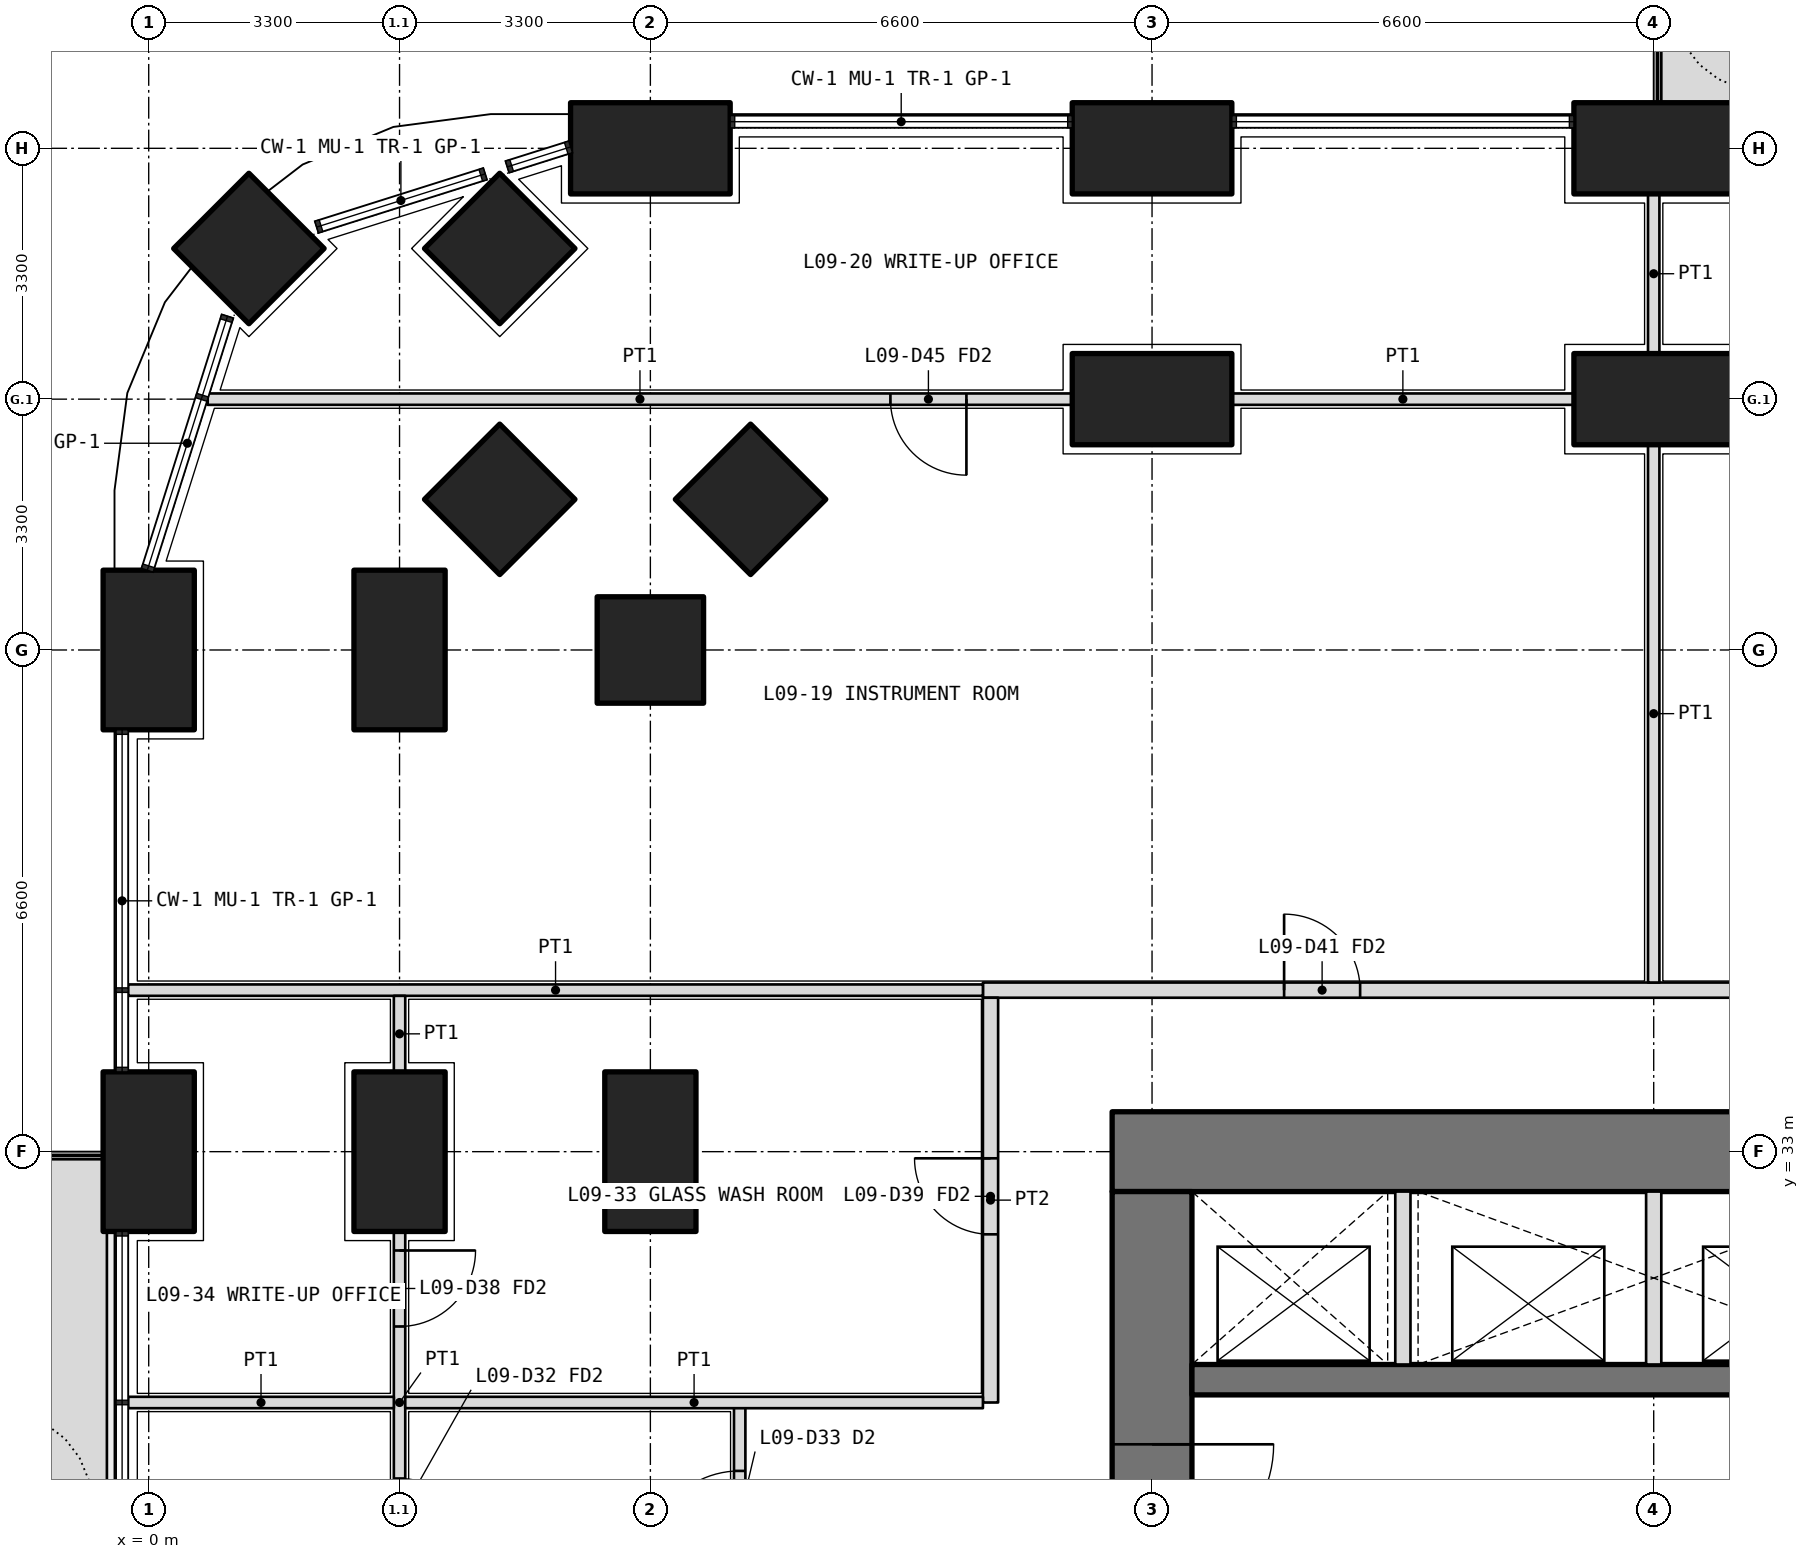
"""IFC4 building model, lengths in metres.
Left out: names, types, materials, properties, quantities, classifications, styles, units other than length and angle.
Written with IfcOpenShell. Run it as: python <this file> out.ifc"""

import sys

from ifc_helpers import new_model, si_unit, direction, frame, frame_2d, origin, origin_2d, place, context, subcontext, project, spatial, polyline, rectangle, outline, extrude, element, fill, save


model = new_model("IFC4")
c1 = context("Model", 3, precision=1e-05, world=origin(), true_north=direction((0.0, 1.0)))
c2 = subcontext(c1, "Body", "Model", "MODEL_VIEW")
j1 = project(units=[si_unit("LENGTHUNIT", "METRE"), si_unit("PLANEANGLEUNIT", "RADIAN")], contexts=[c1])
p1 = place(None, origin())
s1 = spatial("IfcSite", under=j1, at=p1, CompositionType="ELEMENT")
p2 = place(p1, origin())
s2 = spatial("IfcBuilding", under=s1, at=p2, CompositionType="ELEMENT")
p3 = place(p2, frame((0.0, 0.0, 42.3)))
s3 = spatial("IfcBuildingStorey", under=s2, at=p3, CompositionType="ELEMENT", Elevation=42.3)
p4 = place(p3, frame((1.318, 44.882, 0.0), z_axis=(0.0, 0.0, 1.0), x_axis=(0.707106781187, 0.707106781187, 0.0)))
e1 = element("IfcColumn", 1, at=p4, inside=s3, PredefinedType="COLUMN", context=c2, shape_type="SweptSolid", body=[
    extrude(rectangle(XDim=1.4, YDim=1.4, at=origin_2d()), origin(), (0.0, 0.0, 1.0), 4.2),
])
for number, where, z_axis, x_axis in (
    (2, (0.0, 33.0, 0.0), (0.0, 0.0, 1.0), (0.0, 1.0, 0.0)),
    (3, (0.0, 39.6, 0.0), (0.0, 0.0, 1.0), (0.0, 1.0, 0.0)),
    (4, (6.6, 46.2, 0.0), (0.0, 0.0, 1.0), (1.0, 0.0, 0.0)),
    (5, (13.2, 46.2, 0.0), (0.0, 0.0, 1.0), (1.0, 0.0, 0.0)),
    (6, (19.8, 46.2, 0.0), (0.0, 0.0, 1.0), (1.0, 0.0, 0.0)),
):
    element("IfcColumn", number, at=place(p3, frame(where, z_axis=z_axis, x_axis=x_axis)), inside=s3, PredefinedType="COLUMN", context=c2, shape_type="SweptSolid", body=[
        extrude(rectangle(XDim=2.1, YDim=1.2, at=origin_2d()), origin(), (0.0, 0.0, 1.0), 4.2),
    ])
for number, where, z_axis, x_axis in (
    (7, (6.6, 39.6, 0.0), (0.0, 0.0, 1.0), (1.0, 0.0, 0.0)),
    (8, (4.618, 44.882, 0.0), (0.0, 0.0, 1.0), (0.707, 0.707, 0.0)),
):
    element("IfcColumn", number, at=place(p3, frame(where, z_axis=z_axis, x_axis=x_axis)), inside=s3, PredefinedType="COLUMN", context=c2, shape_type="SweptSolid", body=[
        extrude(rectangle(XDim=1.4, YDim=1.4, at=origin_2d()), origin(), (0.0, 0.0, 1.0), 4.2),
    ])
for number, where, z_axis, x_axis in (
    (9, (3.3, 33.0, 0.0), (0.0, 0.0, 1.0), (0.0, 1.0, 0.0)),
    (10, (3.3, 39.6, 0.0), (0.0, 0.0, 1.0), (0.0, 1.0, 0.0)),
):
    element("IfcColumn", number, at=place(p3, frame(where, z_axis=z_axis, x_axis=x_axis)), inside=s3, PredefinedType="COLUMN", context=c2, shape_type="SweptSolid", body=[
        extrude(rectangle(XDim=2.1, YDim=1.2, at=origin_2d()), origin(), (0.0, 0.0, 1.0), 4.2),
    ])
p5 = place(p3, frame((4.618, 41.582, 0.0), z_axis=(0.0, 0.0, 1.0), x_axis=(0.707106781187, 0.707106781187, 0.0)))
e11 = element("IfcColumn", 11, at=p5, inside=s3, PredefinedType="COLUMN", context=c2, shape_type="SweptSolid", body=[
    extrude(rectangle(XDim=1.4, YDim=1.4, at=origin_2d()), origin(), (0.0, 0.0, 1.0), 4.2),
])
for number, where, z_axis, x_axis in (
    (12, (13.2, 42.9, 0.0), (0.0, 0.0, 1.0), (1.0, 0.0, 0.0)),
    (13, (19.8, 42.9, 0.0), (0.0, 0.0, 1.0), (1.0, 0.0, 0.0)),
):
    element("IfcColumn", number, at=place(p3, frame(where, z_axis=z_axis, x_axis=x_axis)), inside=s3, PredefinedType="COLUMN", context=c2, shape_type="SweptSolid", body=[
        extrude(rectangle(XDim=2.1, YDim=1.2, at=origin_2d()), origin(), (0.0, 0.0, 1.0), 4.2),
    ])
p6 = place(p3, frame((7.918, 41.582, 0.0), z_axis=(0.0, 0.0, 1.0), x_axis=(0.707106781187, 0.707106781187, 0.0)))
e14 = element("IfcColumn", 14, at=p6, inside=s3, PredefinedType="COLUMN", context=c2, shape_type="SweptSolid", body=[
    extrude(rectangle(XDim=1.4, YDim=1.4, at=origin_2d()), origin(), (0.0, 0.0, 1.0), 4.2),
])
p7 = place(p3, frame((6.6, 33.0, 0.0), z_axis=(0.0, 0.0, 1.0), x_axis=(0.0, 1.0, 0.0)))
e15 = element("IfcColumn", 15, at=p7, inside=s3, PredefinedType="COLUMN", context=c2, shape_type="SweptSolid", body=[
    extrude(rectangle(XDim=2.1, YDim=1.2, at=origin_2d()), origin(), (0.0, 0.0, 1.0), 4.2),
])
p8 = place(p3, origin())
e16 = element("IfcWall", 16, at=p8, inside=s3, PredefinedType="USERDEFINED", context=c2, shape_type="SweptSolid", body=[
    extrude(outline(polyline([(19.9, 46.75), (22.35, 46.75), (22.35, 47.75), (19.9, 47.75), (19.9, 46.75)]), holes=[polyline([(20.05, 46.9), (22.2, 46.9), (22.2, 47.6), (20.05, 47.6), (20.05, 46.9)])]), origin(), (0.0, 0.0, 1.0), 1.05),
])
p9 = place(p3, origin())
e17 = element("IfcWall", 17, at=p9, inside=s3, PredefinedType="USERDEFINED", context=c2, shape_type="SweptSolid", body=[
    extrude(outline(polyline([(-1.55, 23.85), (-0.55, 23.85), (-0.55, 32.9), (-1.55, 32.9), (-1.55, 23.85)]), holes=[polyline([(-1.4, 24.0), (-0.7, 24.0), (-0.7, 32.75), (-1.4, 32.75), (-1.4, 24.0)])]), origin(), (0.0, 0.0, 1.0), 1.05),
])
p10 = place(p3, frame((40.125, 33.0, 0.0), z_axis=(0.0, 0.0, 1.0), x_axis=(-1.0, 0.0, 0.0)))
e18 = element("IfcWall", 18, at=p10, inside=s3, PredefinedType="SHEAR", context=c2, shape_type="SweptSolid", body=[
    extrude(rectangle(XDim=27.45, YDim=1.05, at=frame_2d((13.725, 0.0))), origin(), (0.0, 0.0, 1.0), 4.2),
])
p11 = place(p3, frame((13.2, 32.475, 0.0), z_axis=(0.0, 0.0, 1.0), x_axis=(0.0, -1.0, 0.0)))
e19 = element("IfcWall", 19, at=p11, inside=s3, PredefinedType="SHEAR", context=c2, shape_type="SweptSolid", body=[
    extrude(rectangle(XDim=18.75, YDim=1.05, at=frame_2d((9.375, 0.0))), origin(), (0.0, 0.0, 1.0), 4.2),
])
p12 = place(p11, frame((14.125, 0.0, 0.0)))
e20 = element("IfcOpeningElement", 20, at=p12, cuts=e19, PredefinedType="OPENING", context=c2, shape_type="SweptSolid", body=[
    extrude(rectangle(XDim=1.6, YDim=2.1, at=frame_2d((0.8, 1.05))), frame((0.0, 0.535, 0.0), z_axis=(0.0, -1.0, 0.0), x_axis=(1.0, 0.0, 0.0)), (0.0, 0.0, 1.0), 1.07),
])
p13 = place(p11, frame((3.325, 0.0, 0.0)))
e21 = element("IfcOpeningElement", 21, at=p13, cuts=e19, PredefinedType="OPENING", context=c2, shape_type="SweptSolid", body=[
    extrude(rectangle(XDim=1.6, YDim=2.1, at=frame_2d((0.8, 1.05))), frame((0.0, 0.535, 0.0), z_axis=(0.0, -1.0, 0.0), x_axis=(1.0, 0.0, 0.0)), (0.0, 0.0, 1.0), 1.07),
])
p14 = place(p3, frame((13.725, 30.0, 0.0), z_axis=(0.0, 0.0, 1.0), x_axis=(1.0, 0.0, 0.0)))
e22 = element("IfcWall", 22, at=p14, inside=s3, PredefinedType="SHEAR", context=c2, shape_type="SweptSolid", body=[
    extrude(rectangle(XDim=25.35, YDim=0.4, at=frame_2d((12.675, 0.0))), origin(), (0.0, 0.0, 1.0), 4.2),
])
for number, where, z_axis, x_axis in (
    (23, (16.5, 30.2, 0.0), (0.0, 0.0, 1.0), (0.0, 1.0, 0.0)),
    (24, (19.8, 30.2, 0.0), (0.0, 0.0, 1.0), (0.0, 1.0, 0.0)),
):
    element("IfcWall", number, at=place(p3, frame(where, z_axis=z_axis, x_axis=x_axis)), inside=s3, PredefinedType="PARTITIONING", context=c2, shape_type="SweptSolid", body=[
        extrude(rectangle(XDim=2.275, YDim=0.2, at=frame_2d((1.138, 0.0))), origin(), (0.0, 0.0, 1.0), 4.2),
    ])
p15 = place(p3, frame((10.975, 35.125, 0.0), z_axis=(0.0, 0.0, 1.0), x_axis=(1.0, 0.0, 0.0)))
e25 = element("IfcWall", 25, at=p15, inside=s3, PredefinedType="PARTITIONING", context=c2, shape_type="SweptSolid", body=[
    extrude(rectangle(XDim=30.85, YDim=0.2, at=frame_2d((15.425, 0.0))), origin(), (0.0, 0.0, 1.0), 2.85),
])
p16 = place(p15, frame((3.962, 0.0, 0.0)))
e26 = element("IfcOpeningElement", 26, at=p16, cuts=e25, PredefinedType="OPENING", context=c2, shape_type="SweptSolid", body=[
    extrude(rectangle(XDim=1.0, YDim=2.1, at=frame_2d((0.5, 1.05))), frame((0.0, 0.11, 0.0), z_axis=(0.0, -1.0, 0.0), x_axis=(1.0, 0.0, 0.0)), (0.0, 0.0, 1.0), 0.22),
])
p17 = place(p15, frame((16.475, 0.0, 0.0)))
e27 = element("IfcOpeningElement", 27, at=p17, cuts=e25, PredefinedType="OPENING", context=c2, shape_type="SweptSolid", body=[
    extrude(rectangle(XDim=1.2, YDim=2.1, at=frame_2d((0.6, 1.05))), frame((0.0, 0.11, 0.0), z_axis=(0.0, -1.0, 0.0), x_axis=(1.0, 0.0, 0.0)), (0.0, 0.0, 1.0), 0.22),
])
p18 = place(p15, frame((27.438, 0.0, 0.0)))
e28 = element("IfcOpeningElement", 28, at=p18, cuts=e25, PredefinedType="OPENING", context=c2, shape_type="SweptSolid", body=[
    extrude(rectangle(XDim=1.2, YDim=2.1, at=frame_2d((0.6, 1.05))), frame((0.0, 0.11, 0.0), z_axis=(0.0, -1.0, 0.0), x_axis=(1.0, 0.0, 0.0)), (0.0, 0.0, 1.0), 0.22),
])
p19 = place(p3, frame((11.075, 29.7, 0.0), z_axis=(0.0, 0.0, 1.0), x_axis=(0.0, 1.0, 0.0)))
e29 = element("IfcWall", 29, at=p19, inside=s3, PredefinedType="PARTITIONING", context=c2, shape_type="SweptSolid", body=[
    extrude(rectangle(XDim=5.325, YDim=0.2, at=frame_2d((2.663, 0.0))), origin(), (0.0, 0.0, 1.0), 2.85),
])
p20 = place(p19, frame((2.212, 0.0, 0.0)))
e30 = element("IfcOpeningElement", 30, at=p20, cuts=e29, PredefinedType="OPENING", context=c2, shape_type="SweptSolid", body=[
    extrude(rectangle(XDim=1.0, YDim=2.1, at=frame_2d((0.5, 1.05))), frame((0.0, 0.11, 0.0), z_axis=(0.0, -1.0, 0.0), x_axis=(1.0, 0.0, 0.0)), (0.0, 0.0, 1.0), 0.22),
])
p21 = place(p3, frame((-0.27, 35.125, 0.0), z_axis=(0.0, 0.0, 1.0), x_axis=(1.0, 0.0, 0.0)))
e31 = element("IfcWall", 31, at=p21, inside=s3, PredefinedType="PARTITIONING", context=c2, shape_type="SweptSolid", body=[
    extrude(rectangle(XDim=11.245, YDim=0.15, at=frame_2d((5.623, 0.0))), origin(), (0.0, 0.0, 1.0), 2.7),
])
p22 = place(p3, frame((18.75, 42.9, 0.0), z_axis=(0.0, 0.0, 1.0), x_axis=(-1.0, 0.0, 0.0)))
e32 = element("IfcWall", 32, at=p22, inside=s3, PredefinedType="PARTITIONING", context=c2, shape_type="SweptSolid", body=[
    extrude(rectangle(XDim=4.5, YDim=0.15, at=frame_2d((2.25, 0.0))), origin(), (0.0, 0.0, 1.0), 3.9),
])
p23 = place(p3, frame((12.15, 42.9, 0.0), z_axis=(0.0, 0.0, 1.0), x_axis=(-1.0, 0.0, 0.0)))
e33 = element("IfcWall", 33, at=p23, inside=s3, PredefinedType="PARTITIONING", context=c2, shape_type="SweptSolid", body=[
    extrude(rectangle(XDim=11.374, YDim=0.15, at=frame_2d((5.687, 0.0))), origin(), (0.0, 0.0, 1.0), 2.7),
])
p24 = place(p23, frame((1.392, 0.0, 0.0)))
e34 = element("IfcOpeningElement", 34, at=p24, cuts=e33, PredefinedType="OPENING", context=c2, shape_type="SweptSolid", body=[
    extrude(rectangle(XDim=1.0, YDim=2.1, at=frame_2d((0.5, 1.05))), frame((0.0, 0.085, 0.0), z_axis=(0.0, -1.0, 0.0), x_axis=(1.0, 0.0, 0.0)), (0.0, 0.0, 1.0), 0.17),
])
p25 = place(p3, frame((19.8, 45.6, 0.0), z_axis=(0.0, 0.0, 1.0), x_axis=(0.0, -1.0, 0.0)))
e35 = element("IfcWall", 35, at=p25, inside=s3, PredefinedType="PARTITIONING", context=c2, shape_type="SweptSolid", body=[
    extrude(rectangle(XDim=2.1, YDim=0.15, at=frame_2d((1.05, 0.0))), origin(), (0.0, 0.0, 1.0), 2.85),
])
p26 = place(p3, frame((19.8, 42.3, 0.0), z_axis=(0.0, 0.0, 1.0), x_axis=(0.0, -1.0, 0.0)))
e36 = element("IfcWall", 36, at=p26, inside=s3, PredefinedType="PARTITIONING", context=c2, shape_type="SweptSolid", body=[
    extrude(rectangle(XDim=7.075, YDim=0.15, at=frame_2d((3.538, 0.0))), origin(), (0.0, 0.0, 1.0), 2.85),
])
p27 = place(p3, frame((3.3, 35.05, 0.0), z_axis=(0.0, 0.0, 1.0), x_axis=(0.0, -1.0, 0.0)))
e37 = element("IfcWall", 37, at=p27, inside=s3, PredefinedType="PARTITIONING", context=c2, shape_type="SweptSolid", body=[
    extrude(rectangle(XDim=1.0, YDim=0.15, at=frame_2d((0.5, 0.0))), origin(), (0.0, 0.0, 1.0), 3.9),
])
p28 = place(p3, frame((3.3, 31.95, 0.0), z_axis=(0.0, 0.0, 1.0), x_axis=(0.0, -1.0, 0.0)))
e38 = element("IfcWall", 38, at=p28, inside=s3, PredefinedType="PARTITIONING", context=c2, shape_type="SweptSolid", body=[
    extrude(rectangle(XDim=4.5, YDim=0.15, at=frame_2d((2.25, 0.0))), origin(), (0.0, 0.0, 1.0), 3.9),
])
p29 = place(p28, frame((3.25, 0.0, 0.0)))
e39 = element("IfcOpeningElement", 39, at=p29, cuts=e38, PredefinedType="OPENING", context=c2, shape_type="SweptSolid", body=[
    extrude(rectangle(XDim=1.0, YDim=2.1, at=frame_2d((0.5, 1.05))), frame((0.0, 0.085, 0.0), z_axis=(0.0, -1.0, 0.0), x_axis=(1.0, 0.0, 0.0)), (0.0, 0.0, 1.0), 0.17),
])
p30 = place(p28, frame((0.25, 0.0, 0.0)))
e40 = element("IfcOpeningElement", 40, at=p30, cuts=e38, PredefinedType="OPENING", context=c2, shape_type="SweptSolid", body=[
    extrude(rectangle(XDim=1.0, YDim=2.1, at=frame_2d((0.5, 1.05))), frame((0.0, 0.085, 0.0), z_axis=(0.0, -1.0, 0.0), x_axis=(1.0, 0.0, 0.0)), (0.0, 0.0, 1.0), 0.17),
])
p31 = place(p3, frame((7.775, 26.4, 0.0), z_axis=(0.0, 0.0, 1.0), x_axis=(0.0, 1.0, 0.0)))
e41 = element("IfcWall", 41, at=p31, inside=s3, PredefinedType="PARTITIONING", context=c2, shape_type="SweptSolid", body=[
    extrude(rectangle(XDim=3.3, YDim=0.15, at=frame_2d((1.65, 0.0))), origin(), (0.0, 0.0, 1.0), 2.85),
])
p32 = place(p31, frame((1.2, 0.0, 0.0)))
e42 = element("IfcOpeningElement", 42, at=p32, cuts=e41, PredefinedType="OPENING", context=c2, shape_type="SweptSolid", body=[
    extrude(rectangle(XDim=1.2, YDim=2.1, at=frame_2d((0.6, 1.05))), frame((0.0, 0.085, 0.0), z_axis=(0.0, -1.0, 0.0), x_axis=(1.0, 0.0, 0.0)), (0.0, 0.0, 1.0), 0.17),
])
p33 = place(p3, frame((-0.27, 29.7, 0.0), z_axis=(0.0, 0.0, 1.0), x_axis=(1.0, 0.0, 0.0)))
e43 = element("IfcWall", 43, at=p33, inside=s3, PredefinedType="PARTITIONING", context=c2, shape_type="SweptSolid", body=[
    extrude(rectangle(XDim=3.495, YDim=0.15, at=frame_2d((1.748, 0.0))), origin(), (0.0, 0.0, 1.0), 2.7),
])
p34 = place(p3, frame((3.375, 29.7, 0.0), z_axis=(0.0, 0.0, 1.0), x_axis=(1.0, 0.0, 0.0)))
e44 = element("IfcWall", 44, at=p34, inside=s3, PredefinedType="PARTITIONING", context=c2, shape_type="SweptSolid", body=[
    extrude(rectangle(XDim=7.6, YDim=0.15, at=frame_2d((3.8, 0.0))), origin(), (0.0, 0.0, 1.0), 3.9),
])
p35 = place(p16, origin())
e45 = element("IfcDoor", 45, at=p35, inside=s3, OperationType="SINGLE_SWING_LEFT", PredefinedType="DOOR", context=c2, shape_type="SweptSolid", body=[
    extrude(rectangle(XDim=1.0, YDim=2.1, at=frame_2d((0.5, 1.05))), frame((0.0, 0.025, 0.0), z_axis=(0.0, -1.0, 0.0), x_axis=(1.0, 0.0, 0.0)), (0.0, 0.0, 1.0), 0.05),
])
fill(e26, e45)
p36 = place(p24, origin())
e46 = element("IfcDoor", 46, at=p36, inside=s3, OperationType="SINGLE_SWING_LEFT", PredefinedType="DOOR", context=c2, shape_type="SweptSolid", body=[
    extrude(rectangle(XDim=1.0, YDim=2.1, at=frame_2d((0.5, 1.05))), frame((0.0, 0.025, 0.0), z_axis=(0.0, -1.0, 0.0), x_axis=(1.0, 0.0, 0.0)), (0.0, 0.0, 1.0), 0.05),
])
fill(e34, e46)
p37 = place(p32, origin())
e47 = element("IfcDoor", 47, at=p37, inside=s3, OperationType="DOUBLE_DOOR_SINGLE_SWING", PredefinedType="DOOR", context=c2, shape_type="SweptSolid", body=[
    extrude(rectangle(XDim=1.2, YDim=2.1, at=frame_2d((0.6, 1.05))), frame((0.0, 0.025, 0.0), z_axis=(0.0, -1.0, 0.0), x_axis=(1.0, 0.0, 0.0)), (0.0, 0.0, 1.0), 0.05),
])
fill(e42, e47)
p38 = place(p20, origin())
e48 = element("IfcDoor", 48, at=p38, inside=s3, OperationType="SINGLE_SWING_RIGHT", PredefinedType="DOOR", context=c2, shape_type="SweptSolid", body=[
    extrude(rectangle(XDim=1.0, YDim=2.1, at=frame_2d((0.5, 1.05))), frame((0.0, 0.025, 0.0), z_axis=(0.0, -1.0, 0.0), x_axis=(1.0, 0.0, 0.0)), (0.0, 0.0, 1.0), 0.05),
])
fill(e30, e48)
p39 = place(p30, origin())
e49 = element("IfcDoor", 49, at=p39, inside=s3, OperationType="SINGLE_SWING_LEFT", PredefinedType="DOOR", context=c2, shape_type="SweptSolid", body=[
    extrude(rectangle(XDim=1.0, YDim=2.1, at=frame_2d((0.5, 1.05))), frame((0.0, 0.025, 0.0), z_axis=(0.0, -1.0, 0.0), x_axis=(1.0, 0.0, 0.0)), (0.0, 0.0, 1.0), 0.05),
])
fill(e40, e49)
p40 = place(p13, origin())
e50 = element("IfcDoor", 50, at=p40, inside=s3, OperationType="DOUBLE_DOOR_DOUBLE_SWING", PredefinedType="DOOR", context=c2, shape_type="SweptSolid", body=[
    extrude(rectangle(XDim=1.6, YDim=2.1, at=frame_2d((0.8, 1.05))), frame((0.0, 0.025, 0.0), z_axis=(0.0, -1.0, 0.0), x_axis=(1.0, 0.0, 0.0)), (0.0, 0.0, 1.0), 0.05),
])
fill(e21, e50)
save(model, sys.argv[1])
